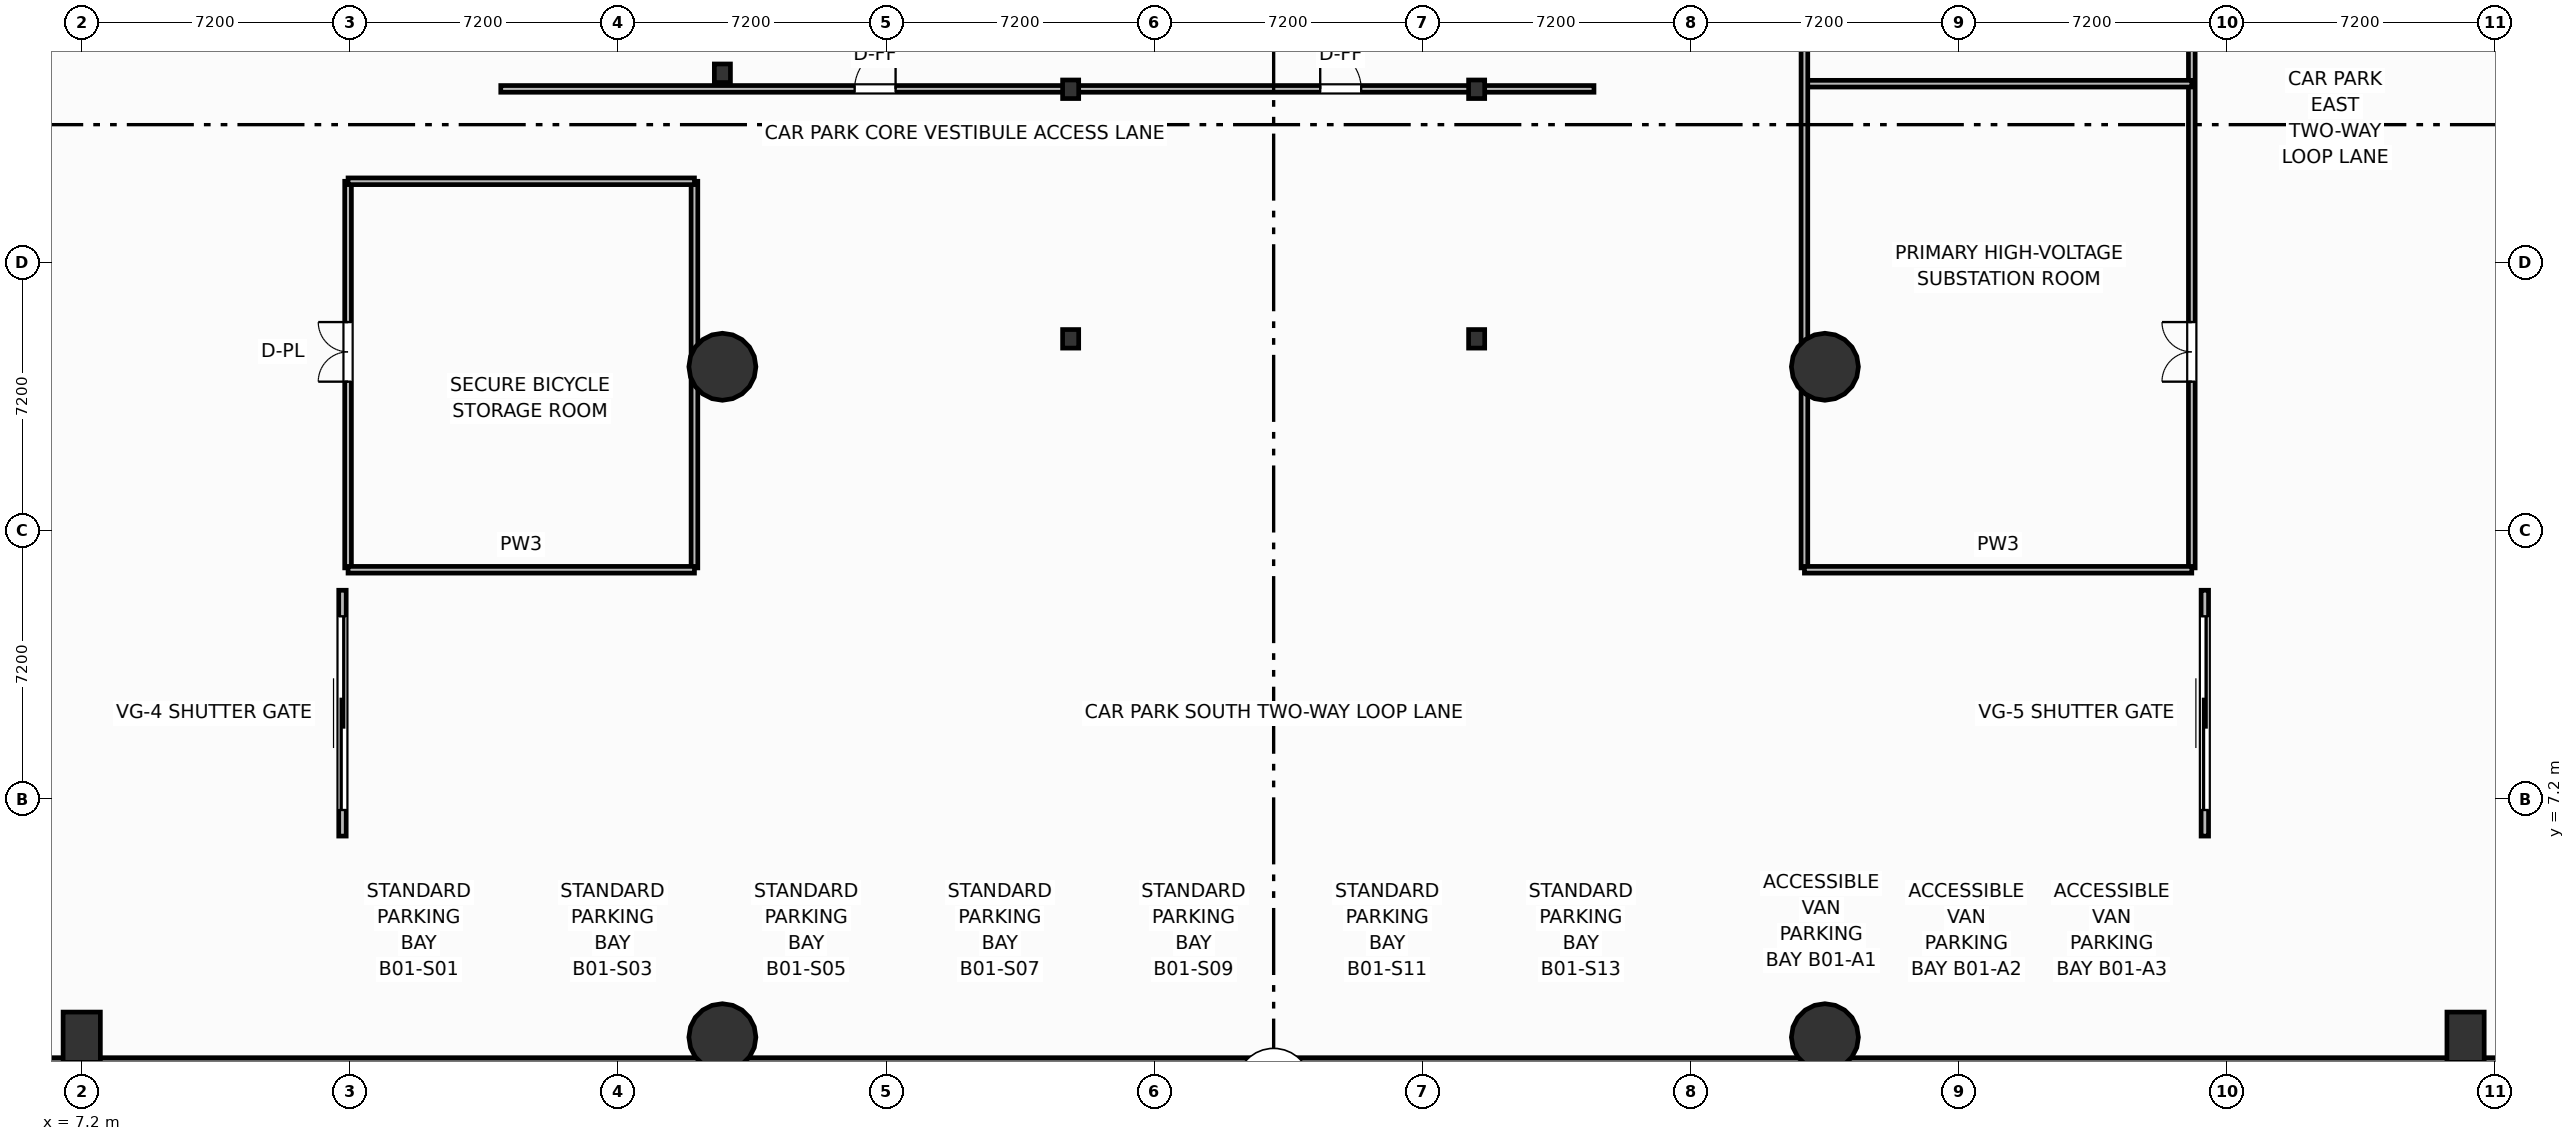
"""IFC4 building model, lengths in metres.
Left out: names, types, materials, properties, quantities, classifications, styles, units other than length and angle.
Written with IfcOpenShell. Run it as: python <this file> out.ifc"""

import sys

from ifc_helpers import new_model, si_unit, direction, frame, frame_2d, origin, origin_2d, place, context, subcontext, project, spatial, rectangle, circle, i_section, extrude, element, fill, save


model = new_model("IFC4")
c1 = context("Model", 3, precision=1e-05, world=origin(), true_north=direction((0.0, 1.0)))
c2 = subcontext(c1, "Body", "Model", "MODEL_VIEW")
j1 = project(units=[si_unit("LENGTHUNIT", "METRE"), si_unit("PLANEANGLEUNIT", "RADIAN")], contexts=[c1])
p1 = place(None, origin())
s1 = spatial("IfcSite", under=j1, at=p1, CompositionType="ELEMENT")
p2 = place(p1, origin())
s2 = spatial("IfcBuilding", under=s1, at=p2, CompositionType="ELEMENT")
p3 = place(p2, frame((0.0, 0.0, -4.5)))
s3 = spatial("IfcBuildingStorey", under=s2, at=p3, CompositionType="ELEMENT", Elevation=-4.5)
for number, where, z_axis, x_axis in (
    (1, (33.75, 19.55, 0.0), (0.0, 0.0, 1.0), (1.0, 0.0, 0.0)),
    (2, (44.65, 19.55, 0.0), (0.0, 0.0, 1.0), (1.0, 0.0, 0.0)),
    (3, (33.75, 26.25, 0.0), (0.0, 0.0, 1.0), (1.0, 0.0, 0.0)),
    (4, (44.65, 26.25, 0.0), (0.0, 0.0, 1.0), (1.0, 0.0, 0.0)),
    (5, (24.4, 26.68, 0.0), (0.0, 0.0, 1.0), (1.0, 0.0, 0.0)),
):
    element("IfcColumn", number, at=place(p3, frame(where, z_axis=z_axis, x_axis=x_axis)), inside=s3, PredefinedType="COLUMN", context=c2, shape_type="SweptSolid", body=[
        extrude(i_section(OverallWidth=0.432, OverallDepth=0.498, WebThickness=0.056, FlangeThickness=0.089, FilletRadius=0.025, at=origin_2d()), origin(), (0.0, 0.0, 1.0), 4.5),
    ])
p4 = place(p3, frame((7.2, 0.8, 0.0), z_axis=(0.0, 0.0, 1.0), x_axis=(1.0, 0.0, 0.0)))
e6 = element("IfcColumn", 6, at=p4, inside=s3, PredefinedType="COLUMN", context=c2, shape_type="SweptSolid", body=[
    extrude(rectangle(XDim=1.0, YDim=1.35, at=origin_2d()), origin(), (0.0, 0.0, 1.0), 4.5),
])
for number, where, z_axis, x_axis in (
    (7, (24.4, 0.8, 0.0), (0.0, 0.0, 1.0), (1.0, 0.0, 0.0)),
    (8, (54.0, 0.8, 0.0), (0.0, 0.0, 1.0), (1.0, 0.0, 0.0)),
):
    element("IfcColumn", number, at=place(p3, frame(where, z_axis=z_axis, x_axis=x_axis)), inside=s3, PredefinedType="COLUMN", context=c2, shape_type="SweptSolid", body=[
        extrude(circle(Radius=0.9, at=origin_2d()), origin(), (0.0, 0.0, 1.0), 4.5),
    ])
p5 = place(p3, frame((71.2, 0.8, 0.0), z_axis=(0.0, 0.0, 1.0), x_axis=(1.0, 0.0, 0.0)))
e9 = element("IfcColumn", 9, at=p5, inside=s3, PredefinedType="COLUMN", context=c2, shape_type="SweptSolid", body=[
    extrude(rectangle(XDim=1.0, YDim=1.35, at=origin_2d()), origin(), (0.0, 0.0, 1.0), 4.5),
])
for number, where, z_axis, x_axis in (
    (10, (24.4, 18.8, 0.0), (0.0, 0.0, 1.0), (1.0, 0.0, 0.0)),
    (11, (54.0, 18.8, 0.0), (0.0, 0.0, 1.0), (1.0, 0.0, 0.0)),
):
    element("IfcColumn", number, at=place(p3, frame(where, z_axis=z_axis, x_axis=x_axis)), inside=s3, PredefinedType="COLUMN", context=c2, shape_type="SweptSolid", body=[
        extrude(circle(Radius=0.9, at=origin_2d()), origin(), (0.0, 0.0, 1.0), 4.5),
    ])
p6 = place(p3, frame((72.8, 0.0, 0.0), z_axis=(0.0, 0.0, 1.0), x_axis=(-1.0, 0.0, 0.0)))
e12 = element("IfcWall", 12, at=p6, inside=s3, PredefinedType="SOLIDWALL", context=c2, shape_type="SweptSolid", body=[
    extrude(rectangle(XDim=67.2, YDim=0.5, at=frame_2d((33.6, 0.0))), origin(), (0.0, 0.0, 1.0), 4.18),
])
p7 = place(p3, frame((18.45, 26.26, 0.0), z_axis=(0.0, 0.0, 1.0), x_axis=(1.0, 0.0, 0.0)))
e13 = element("IfcWall", 13, at=p7, inside=s3, PredefinedType="PARTITIONING", context=c2, shape_type="SweptSolid", body=[
    extrude(rectangle(XDim=29.35, YDim=0.18, at=frame_2d((14.675, 0.0))), origin(), (0.0, 0.0, 1.0), 3.392),
])
p8 = place(p7, frame((9.5, 0.0, 0.0)))
e14 = element("IfcOpeningElement", 14, at=p8, cuts=e13, PredefinedType="OPENING", context=c2, shape_type="SweptSolid", body=[
    extrude(rectangle(XDim=1.1, YDim=2.15, at=frame_2d((0.55, 1.075))), frame((0.0, 0.1, 0.0), z_axis=(0.0, -1.0, 0.0), x_axis=(1.0, 0.0, 0.0)), (0.0, 0.0, 1.0), 0.2),
])
p9 = place(p7, frame((22.0, 0.0, 0.0)))
e15 = element("IfcOpeningElement", 15, at=p9, cuts=e13, PredefinedType="OPENING", context=c2, shape_type="SweptSolid", body=[
    extrude(rectangle(XDim=1.1, YDim=2.15, at=frame_2d((0.55, 1.075))), frame((0.0, 0.1, 0.0), z_axis=(0.0, -1.0, 0.0), x_axis=(1.0, 0.0, 0.0)), (0.0, 0.0, 1.0), 0.2),
])
p10 = place(p3, frame((14.2, 6.2, 0.0), z_axis=(0.0, 0.0, 1.0), x_axis=(0.0, 1.0, 0.0)))
e16 = element("IfcWall", 16, at=p10, inside=s3, PredefinedType="PARTITIONING", context=c2, shape_type="SweptSolid", body=[
    extrude(rectangle(XDim=6.6, YDim=0.2, at=frame_2d((3.3, 0.0))), origin(), (0.0, 0.0, 1.0), 4.18),
])
p11 = place(p10, frame((0.7, 0.0, 0.0)))
e17 = element("IfcOpeningElement", 17, at=p11, cuts=e16, PredefinedType="OPENING", context=c2, shape_type="SweptSolid", body=[
    extrude(rectangle(XDim=5.2, YDim=2.8, at=frame_2d((2.6, 1.4))), frame((0.0, 0.11, 0.0), z_axis=(0.0, -1.0, 0.0), x_axis=(1.0, 0.0, 0.0)), (0.0, 0.0, 1.0), 0.22),
])
p12 = place(p3, frame((64.2, 6.2, 0.0), z_axis=(0.0, 0.0, 1.0), x_axis=(0.0, 1.0, 0.0)))
e18 = element("IfcWall", 18, at=p12, inside=s3, PredefinedType="PARTITIONING", context=c2, shape_type="SweptSolid", body=[
    extrude(rectangle(XDim=6.6, YDim=0.2, at=frame_2d((3.3, 0.0))), origin(), (0.0, 0.0, 1.0), 4.18),
])
p13 = place(p12, frame((0.7, 0.0, 0.0)))
e19 = element("IfcOpeningElement", 19, at=p13, cuts=e18, PredefinedType="OPENING", context=c2, shape_type="SweptSolid", body=[
    extrude(rectangle(XDim=5.2, YDim=2.8, at=frame_2d((2.6, 1.4))), frame((0.0, 0.11, 0.0), z_axis=(0.0, -1.0, 0.0), x_axis=(1.0, 0.0, 0.0)), (0.0, 0.0, 1.0), 0.22),
])
p14 = place(p3, frame((14.35, 13.4, 0.0), z_axis=(0.0, 0.0, 1.0), x_axis=(0.0, 1.0, 0.0)))
e20 = element("IfcWall", 20, at=p14, inside=s3, PredefinedType="PARTITIONING", context=c2, shape_type="SweptSolid", body=[
    extrude(rectangle(XDim=10.38, YDim=0.18, at=frame_2d((5.19, 0.0))), origin(), (0.0, 0.0, 1.0), 4.18),
])
p15 = place(p14, frame((5.0, 0.0, 0.0)))
e21 = element("IfcOpeningElement", 21, at=p15, cuts=e20, PredefinedType="OPENING", context=c2, shape_type="SweptSolid", body=[
    extrude(rectangle(XDim=1.6, YDim=2.05, at=frame_2d((0.8, 1.025))), frame((0.0, 0.1, 0.0), z_axis=(0.0, -1.0, 0.0), x_axis=(1.0, 0.0, 0.0)), (0.0, 0.0, 1.0), 0.2),
])
p16 = place(p3, frame((23.65, 13.4, 0.0), z_axis=(0.0, 0.0, 1.0), x_axis=(0.0, 1.0, 0.0)))
e22 = element("IfcWall", 22, at=p16, inside=s3, PredefinedType="PARTITIONING", context=c2, shape_type="SweptSolid", body=[
    extrude(rectangle(XDim=10.38, YDim=0.18, at=frame_2d((5.19, 0.0))), origin(), (0.0, 0.0, 1.0), 4.18),
])
for number, where, z_axis, x_axis in (
    (23, (14.35, 13.35, 0.0), (0.0, 0.0, 1.0), (1.0, 0.0, 0.0)),
    (24, (14.35, 23.78, 0.0), (0.0, 0.0, 1.0), (1.0, 0.0, 0.0)),
):
    element("IfcWall", number, at=place(p3, frame(where, z_axis=z_axis, x_axis=x_axis)), inside=s3, PredefinedType="PARTITIONING", context=c2, shape_type="SweptSolid", body=[
        extrude(rectangle(XDim=9.3, YDim=0.18, at=frame_2d((4.65, 0.0))), origin(), (0.0, 0.0, 1.0), 4.18),
    ])
p17 = place(p3, frame((63.85, 13.4, 0.0), z_axis=(0.0, 0.0, 1.0), x_axis=(0.0, 1.0, 0.0)))
e25 = element("IfcWall", 25, at=p17, inside=s3, PredefinedType="PARTITIONING", context=c2, shape_type="SweptSolid", body=[
    extrude(rectangle(XDim=25.0, YDim=0.18, at=frame_2d((12.5, 0.0))), origin(), (0.0, 0.0, 1.0), 4.18),
])
p18 = place(p17, frame((5.0, 0.0, 0.0)))
e26 = element("IfcOpeningElement", 26, at=p18, cuts=e25, PredefinedType="OPENING", context=c2, shape_type="SweptSolid", body=[
    extrude(rectangle(XDim=1.6, YDim=2.05, at=frame_2d((0.8, 1.025))), frame((0.0, 0.1, 0.0), z_axis=(0.0, -1.0, 0.0), x_axis=(1.0, 0.0, 0.0)), (0.0, 0.0, 1.0), 0.2),
])
p19 = place(p17, frame((17.5, 0.0, 0.0)))
e27 = element("IfcOpeningElement", 27, at=p19, cuts=e25, PredefinedType="OPENING", context=c2, shape_type="SweptSolid", body=[
    extrude(rectangle(XDim=1.6, YDim=2.05, at=frame_2d((0.8, 1.025))), frame((0.0, 0.1, 0.0), z_axis=(0.0, -1.0, 0.0), x_axis=(1.0, 0.0, 0.0)), (0.0, 0.0, 1.0), 0.2),
])
p20 = place(p3, frame((53.45, 26.4, 0.0), z_axis=(0.0, 0.0, 1.0), x_axis=(1.0, 0.0, 0.0)))
e28 = element("IfcWall", 28, at=p20, inside=s3, PredefinedType="PARTITIONING", context=c2, shape_type="SweptSolid", body=[
    extrude(rectangle(XDim=10.4, YDim=0.18, at=frame_2d((5.2, 0.0))), origin(), (0.0, 0.0, 1.0), 4.18),
])
p21 = place(p3, frame((53.45, 13.4, 0.0), z_axis=(0.0, 0.0, 1.0), x_axis=(0.0, 1.0, 0.0)))
e29 = element("IfcWall", 29, at=p21, inside=s3, PredefinedType="PARTITIONING", context=c2, shape_type="SweptSolid", body=[
    extrude(rectangle(XDim=25.0, YDim=0.18, at=frame_2d((12.5, 0.0))), origin(), (0.0, 0.0, 1.0), 4.18),
])
p22 = place(p3, frame((53.45, 13.35, 0.0), z_axis=(0.0, 0.0, 1.0), x_axis=(1.0, 0.0, 0.0)))
e30 = element("IfcWall", 30, at=p22, inside=s3, PredefinedType="PARTITIONING", context=c2, shape_type="SweptSolid", body=[
    extrude(rectangle(XDim=10.4, YDim=0.18, at=frame_2d((5.2, 0.0))), origin(), (0.0, 0.0, 1.0), 4.18),
])
p23 = place(p8, origin())
e31 = element("IfcDoor", 31, at=p23, inside=s3, OperationType="SINGLE_SWING_RIGHT", PredefinedType="DOOR", context=c2, shape_type="SweptSolid", body=[
    extrude(rectangle(XDim=1.1, YDim=2.15, at=frame_2d((0.55, 1.075))), frame((0.0, 0.025, 0.0), z_axis=(0.0, -1.0, 0.0), x_axis=(1.0, 0.0, 0.0)), (0.0, 0.0, 1.0), 0.05),
])
fill(e14, e31)
p24 = place(p9, origin())
e32 = element("IfcDoor", 32, at=p24, inside=s3, OperationType="SINGLE_SWING_LEFT", PredefinedType="DOOR", context=c2, shape_type="SweptSolid", body=[
    extrude(rectangle(XDim=1.1, YDim=2.15, at=frame_2d((0.55, 1.075))), frame((0.0, 0.025, 0.0), z_axis=(0.0, -1.0, 0.0), x_axis=(1.0, 0.0, 0.0)), (0.0, 0.0, 1.0), 0.05),
])
fill(e15, e32)
p25 = place(p11, origin())
e33 = element("IfcDoor", 33, at=p25, inside=s3, OperationType="SLIDING_TO_LEFT", PredefinedType="GATE", context=c2, shape_type="SweptSolid", body=[
    extrude(rectangle(XDim=5.2, YDim=2.8, at=frame_2d((2.6, 1.4))), frame((0.0, 0.025, 0.0), z_axis=(0.0, -1.0, 0.0), x_axis=(1.0, 0.0, 0.0)), (0.0, 0.0, 1.0), 0.05),
])
fill(e17, e33)
p26 = place(p13, origin())
e34 = element("IfcDoor", 34, at=p26, inside=s3, OperationType="SLIDING_TO_LEFT", PredefinedType="GATE", context=c2, shape_type="SweptSolid", body=[
    extrude(rectangle(XDim=5.2, YDim=2.8, at=frame_2d((2.6, 1.4))), frame((0.0, 0.025, 0.0), z_axis=(0.0, -1.0, 0.0), x_axis=(1.0, 0.0, 0.0)), (0.0, 0.0, 1.0), 0.05),
])
fill(e19, e34)
p27 = place(p15, origin())
e35 = element("IfcDoor", 35, at=p27, inside=s3, OperationType="DOUBLE_DOOR_SINGLE_SWING", PredefinedType="DOOR", context=c2, shape_type="SweptSolid", body=[
    extrude(rectangle(XDim=1.6, YDim=2.05, at=frame_2d((0.8, 1.025))), frame((0.0, 0.025, 0.0), z_axis=(0.0, -1.0, 0.0), x_axis=(1.0, 0.0, 0.0)), (0.0, 0.0, 1.0), 0.05),
])
fill(e21, e35)
p28 = place(p18, origin())
e36 = element("IfcDoor", 36, at=p28, inside=s3, OperationType="DOUBLE_DOOR_SINGLE_SWING", PredefinedType="DOOR", context=c2, shape_type="SweptSolid", body=[
    extrude(rectangle(XDim=1.6, YDim=2.05, at=frame_2d((0.8, 1.025))), frame((0.0, 0.025, 0.0), z_axis=(0.0, -1.0, 0.0), x_axis=(1.0, 0.0, 0.0)), (0.0, 0.0, 1.0), 0.05),
])
fill(e26, e36)
save(model, sys.argv[1])
